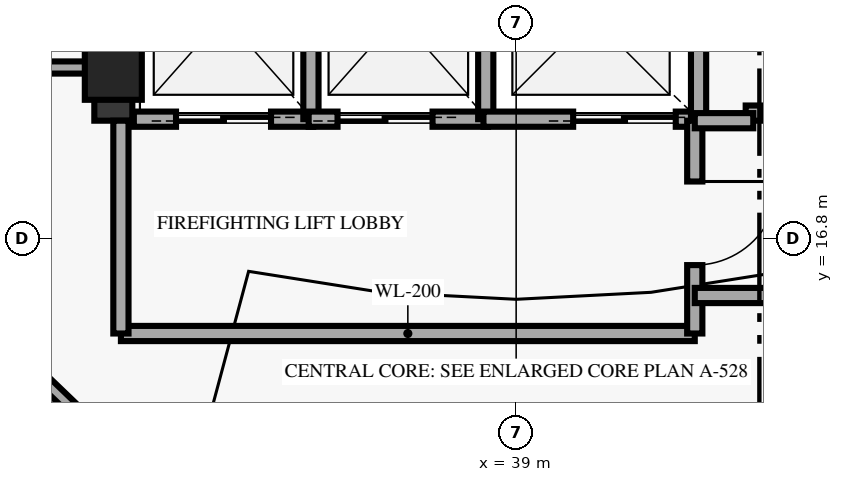
"""IFC4 building model, lengths in metres.
Left out: names, types, materials, properties, quantities, classifications, styles, units other than length and angle.
Written with IfcOpenShell. Run it as: python <this file> out.ifc"""

import sys

from ifc_helpers import new_model, si_unit, direction, frame, frame_2d, origin, origin_2d, place, context, subcontext, project, spatial, rectangle, extrude, element, fill, save


model = new_model("IFC4")
c1 = context("Model", 3, precision=1e-05, world=origin(), true_north=direction((0.0, 1.0)))
c2 = subcontext(c1, "Body", "Model", "MODEL_VIEW")
j1 = project(units=[si_unit("LENGTHUNIT", "METRE"), si_unit("PLANEANGLEUNIT", "RADIAN")], contexts=[c1])
p1 = place(None, origin())
s1 = spatial("IfcSite", under=j1, at=p1, CompositionType="ELEMENT")
p2 = place(p1, origin())
s2 = spatial("IfcBuilding", under=s1, at=p2, CompositionType="ELEMENT")
p3 = place(p2, frame((0.0, 0.0, 306.8)))
s3 = spatial("IfcBuildingStorey", under=s2, at=p3, CompositionType="ELEMENT", Elevation=306.8)
p4 = place(p3, frame((33.7, 19.0, 0.0), z_axis=(0.0, 0.0, 1.0), x_axis=(1.0, 0.0, 0.0)))
e1 = element("IfcColumn", 1, at=p4, inside=s3, PredefinedType="PILASTER", context=c2, shape_type="SweptSolid", body=[
    extrude(rectangle(XDim=0.75, YDim=0.75, at=origin_2d()), origin(), (0.0, 0.0, 1.0), 6.18),
])
p5 = place(p3, frame((33.7, 18.35, 0.0), z_axis=(0.0, 0.0, 1.0), x_axis=(0.0, 1.0, 0.0)))
e2 = element("IfcWall", 2, at=p5, inside=s3, PredefinedType="SHEAR", context=c2, shape_type="SweptSolid", body=[
    extrude(rectangle(XDim=2.95, YDim=0.5, at=frame_2d((1.475, 0.0))), origin(), (0.0, 0.0, 1.0), 6.18),
])
p6 = place(p3, frame((33.97, 18.37, 0.0), z_axis=(0.0, 0.0, 1.0), x_axis=(1.0, 0.0, 0.0)))
e3 = element("IfcWall", 3, at=p6, inside=s3, PredefinedType="SOLIDWALL", context=c2, shape_type="SweptSolid", body=[
    extrude(rectangle(XDim=2.36, YDim=0.2, at=frame_2d((1.18, 0.0))), origin(), (0.0, 0.0, 1.0), 6.18),
])
p7 = place(p6, frame((0.555, 0.0, 0.0)))
e4 = element("IfcOpeningElement", 4, at=p7, cuts=e3, PredefinedType="OPENING", context=c2, shape_type="SweptSolid", body=[
    extrude(rectangle(XDim=1.25, YDim=2.2, at=frame_2d((0.625, 1.1))), frame((0.0, 0.11, 0.0), z_axis=(0.0, -1.0, 0.0), x_axis=(1.0, 0.0, 0.0)), (0.0, 0.0, 1.0), 0.22),
])
p8 = place(p3, frame((36.3, 18.37, 0.0), z_axis=(0.0, 0.0, 1.0), x_axis=(0.0, 1.0, 0.0)))
e5 = element("IfcWall", 5, at=p8, inside=s3, PredefinedType="SOLIDWALL", context=c2, shape_type="SweptSolid", body=[
    extrude(rectangle(XDim=2.71, YDim=0.2, at=frame_2d((1.355, 0.0))), origin(), (0.0, 0.0, 1.0), 6.18),
])
p9 = place(p3, frame((36.27, 18.37, 0.0), z_axis=(0.0, 0.0, 1.0), x_axis=(1.0, 0.0, 0.0)))
e6 = element("IfcWall", 6, at=p9, inside=s3, PredefinedType="SOLIDWALL", context=c2, shape_type="SweptSolid", body=[
    extrude(rectangle(XDim=2.36, YDim=0.2, at=frame_2d((1.18, 0.0))), origin(), (0.0, 0.0, 1.0), 6.18),
])
p10 = place(p9, frame((0.38, 0.0, 0.0)))
e7 = element("IfcOpeningElement", 7, at=p10, cuts=e6, PredefinedType="OPENING", context=c2, shape_type="SweptSolid", body=[
    extrude(rectangle(XDim=1.25, YDim=2.2, at=frame_2d((0.625, 1.1))), frame((0.0, 0.11, 0.0), z_axis=(0.0, -1.0, 0.0), x_axis=(1.0, 0.0, 0.0)), (0.0, 0.0, 1.0), 0.22),
])
p11 = place(p3, frame((38.6, 18.37, 0.0), z_axis=(0.0, 0.0, 1.0), x_axis=(0.0, 1.0, 0.0)))
e8 = element("IfcWall", 8, at=p11, inside=s3, PredefinedType="SOLIDWALL", context=c2, shape_type="SweptSolid", body=[
    extrude(rectangle(XDim=2.71, YDim=0.2, at=frame_2d((1.355, 0.0))), origin(), (0.0, 0.0, 1.0), 6.18),
])
p12 = place(p3, frame((38.57, 18.37, 0.0), z_axis=(0.0, 0.0, 1.0), x_axis=(1.0, 0.0, 0.0)))
e9 = element("IfcWall", 9, at=p12, inside=s3, PredefinedType="SOLIDWALL", context=c2, shape_type="SweptSolid", body=[
    extrude(rectangle(XDim=2.83, YDim=0.2, at=frame_2d((1.415, 0.0))), origin(), (0.0, 0.0, 1.0), 6.18),
])
p13 = place(p12, frame((1.18, 0.0, 0.0)))
e10 = element("IfcOpeningElement", 10, at=p13, cuts=e9, PredefinedType="OPENING", context=c2, shape_type="SweptSolid", body=[
    extrude(rectangle(XDim=1.35, YDim=2.18, at=frame_2d((0.675, 1.09))), frame((0.0, 0.11, 0.0), z_axis=(0.0, -1.0, 0.0), x_axis=(1.0, 0.0, 0.0)), (0.0, 0.0, 1.0), 0.22),
])
p14 = place(p3, frame((41.4, 18.37, 0.0), z_axis=(0.0, 0.0, 1.0), x_axis=(0.0, 1.0, 0.0)))
e11 = element("IfcWall", 11, at=p14, inside=s3, PredefinedType="SOLIDWALL", context=c2, shape_type="SweptSolid", body=[
    extrude(rectangle(XDim=2.71, YDim=0.2, at=frame_2d((1.355, 0.0))), origin(), (0.0, 0.0, 1.0), 6.18),
])
p15 = place(p3, frame((29.05, 19.05, 0.0), z_axis=(0.0, 0.0, 1.0), x_axis=(1.0, 0.0, 0.0)))
e12 = element("IfcWall", 12, at=p15, inside=s3, PredefinedType="PARTITIONING", context=c2, shape_type="SweptSolid", body=[
    extrude(rectangle(XDim=4.65, YDim=0.16, at=frame_2d((2.325, 0.0))), origin(), (0.0, 0.0, 1.0), 6.18),
])
p16 = place(p3, frame((33.8, 15.55, 0.0), z_axis=(0.0, 0.0, 1.0), x_axis=(1.0, 0.0, 0.0)))
e13 = element("IfcWall", 13, at=p16, inside=s3, PredefinedType="SOLIDWALL", context=c2, shape_type="SweptSolid", body=[
    extrude(rectangle(XDim=7.55, YDim=0.2, at=frame_2d((3.775, 0.0))), origin(), (0.0, 0.0, 1.0), 6.18),
])
p17 = place(p3, frame((33.8, 15.55, 0.0), z_axis=(0.0, 0.0, 1.0), x_axis=(0.0, 1.0, 0.0)))
e14 = element("IfcWall", 14, at=p17, inside=s3, PredefinedType="SOLIDWALL", context=c2, shape_type="SweptSolid", body=[
    extrude(rectangle(XDim=2.8, YDim=0.2, at=frame_2d((1.4, 0.0))), origin(), (0.0, 0.0, 1.0), 6.18),
])
p18 = place(p3, frame((41.35, 15.55, 0.0), z_axis=(0.0, 0.0, 1.0), x_axis=(0.0, 1.0, 0.0)))
e15 = element("IfcWall", 15, at=p18, inside=s3, PredefinedType="SOLIDWALL", context=c2, shape_type="SweptSolid", body=[
    extrude(rectangle(XDim=2.8, YDim=0.2, at=frame_2d((1.4, 0.0))), origin(), (0.0, 0.0, 1.0), 6.18),
])
p19 = place(p18, frame((0.9, 0.0, 0.0)))
e16 = element("IfcOpeningElement", 16, at=p19, cuts=e15, PredefinedType="OPENING", context=c2, shape_type="SweptSolid", body=[
    extrude(rectangle(XDim=1.1, YDim=2.15, at=frame_2d((0.55, 1.075))), frame((0.0, 0.11, 0.0), z_axis=(0.0, -1.0, 0.0), x_axis=(1.0, 0.0, 0.0)), (0.0, 0.0, 1.0), 0.22),
])
p20 = place(p3, frame((41.35, 16.05, 0.0), z_axis=(0.0, 0.0, 1.0), x_axis=(1.0, 0.0, 0.0)))
e17 = element("IfcWall", 17, at=p20, inside=s3, PredefinedType="SOLIDWALL", context=c2, shape_type="SweptSolid", body=[
    extrude(rectangle(XDim=4.5, YDim=0.2, at=frame_2d((2.25, 0.0))), origin(), (0.0, 0.0, 1.0), 6.18),
])
p21 = place(p3, frame((42.12, 18.35, 0.0), z_axis=(0.0, 0.0, 1.0), x_axis=(0.0, 1.0, 0.0)))
e18 = element("IfcWall", 18, at=p21, inside=s3, PredefinedType="SOLIDWALL", context=c2, shape_type="SweptSolid", body=[
    extrude(rectangle(XDim=2.95, YDim=0.2, at=frame_2d((1.475, 0.0))), origin(), (0.0, 0.0, 1.0), 6.18),
])
p22 = place(p21, frame((0.2, 0.0, 0.0)))
e19 = element("IfcOpeningElement", 19, at=p22, cuts=e18, PredefinedType="OPENING", context=c2, shape_type="SweptSolid", body=[
    extrude(rectangle(XDim=0.8, YDim=2.05, at=frame_2d((0.4, 1.025))), frame((0.0, 0.11, 0.0), z_axis=(0.0, -1.0, 0.0), x_axis=(1.0, 0.0, 0.0)), (0.0, 0.0, 1.0), 0.22),
])
p23 = place(p3, frame((41.35, 18.35, 0.0), z_axis=(0.0, 0.0, 1.0), x_axis=(1.0, 0.0, 0.0)))
e20 = element("IfcWall", 20, at=p23, inside=s3, PredefinedType="SOLIDWALL", context=c2, shape_type="SweptSolid", body=[
    extrude(rectangle(XDim=0.77, YDim=0.2, at=frame_2d((0.385, 0.0))), origin(), (0.0, 0.0, 1.0), 6.18),
])
p24 = place(p3, frame((30.939, 16.703, 0.0), z_axis=(0.0, 0.0, 1.0), x_axis=(0.72090897908, -0.693029756851, 0.0)))
e21 = element("IfcWall", 21, at=p24, inside=s3, PredefinedType="PARTITIONING", context=c2, shape_type="SweptSolid", body=[
    extrude(rectangle(XDim=3.275, YDim=0.16, at=frame_2d((1.638, 0.0))), origin(), (0.0, 0.0, 1.0), 6.18),
])
p25 = place(p7, origin())
e22 = element("IfcDoor", 22, at=p25, inside=s3, OperationType="DOUBLE_DOOR_SLIDING", PredefinedType="DOOR", context=c2, shape_type="SweptSolid", body=[
    extrude(rectangle(XDim=1.25, YDim=2.2, at=frame_2d((0.625, 1.1))), frame((0.0, 0.025, 0.0), z_axis=(0.0, -1.0, 0.0), x_axis=(1.0, 0.0, 0.0)), (0.0, 0.0, 1.0), 0.05),
])
fill(e4, e22)
p26 = place(p10, origin())
e23 = element("IfcDoor", 23, at=p26, inside=s3, OperationType="DOUBLE_DOOR_SLIDING", PredefinedType="DOOR", context=c2, shape_type="SweptSolid", body=[
    extrude(rectangle(XDim=1.25, YDim=2.2, at=frame_2d((0.625, 1.1))), frame((0.0, 0.025, 0.0), z_axis=(0.0, -1.0, 0.0), x_axis=(1.0, 0.0, 0.0)), (0.0, 0.0, 1.0), 0.05),
])
fill(e7, e23)
p27 = place(p13, origin())
e24 = element("IfcDoor", 24, at=p27, inside=s3, OperationType="DOUBLE_DOOR_SLIDING", PredefinedType="DOOR", context=c2, shape_type="SweptSolid", body=[
    extrude(rectangle(XDim=1.35, YDim=2.18, at=frame_2d((0.675, 1.09))), frame((0.0, 0.025, 0.0), z_axis=(0.0, -1.0, 0.0), x_axis=(1.0, 0.0, 0.0)), (0.0, 0.0, 1.0), 0.05),
])
fill(e10, e24)
p28 = place(p19, origin())
e25 = element("IfcDoor", 25, at=p28, inside=s3, OperationType="SINGLE_SWING_RIGHT", PredefinedType="DOOR", context=c2, shape_type="SweptSolid", body=[
    extrude(rectangle(XDim=1.1, YDim=2.15, at=frame_2d((0.55, 1.075))), frame((0.0, 0.025, 0.0), z_axis=(0.0, -1.0, 0.0), x_axis=(1.0, 0.0, 0.0)), (0.0, 0.0, 1.0), 0.05),
])
fill(e16, e25)
p29 = place(p22, origin())
e26 = element("IfcDoor", 26, at=p29, inside=s3, OperationType="SINGLE_SWING_LEFT", PredefinedType="DOOR", context=c2, shape_type="SweptSolid", body=[
    extrude(rectangle(XDim=0.8, YDim=2.05, at=frame_2d((0.4, 1.025))), frame((0.0, 0.025, 0.0), z_axis=(0.0, -1.0, 0.0), x_axis=(1.0, 0.0, 0.0)), (0.0, 0.0, 1.0), 0.05),
])
fill(e19, e26)
save(model, sys.argv[1])
